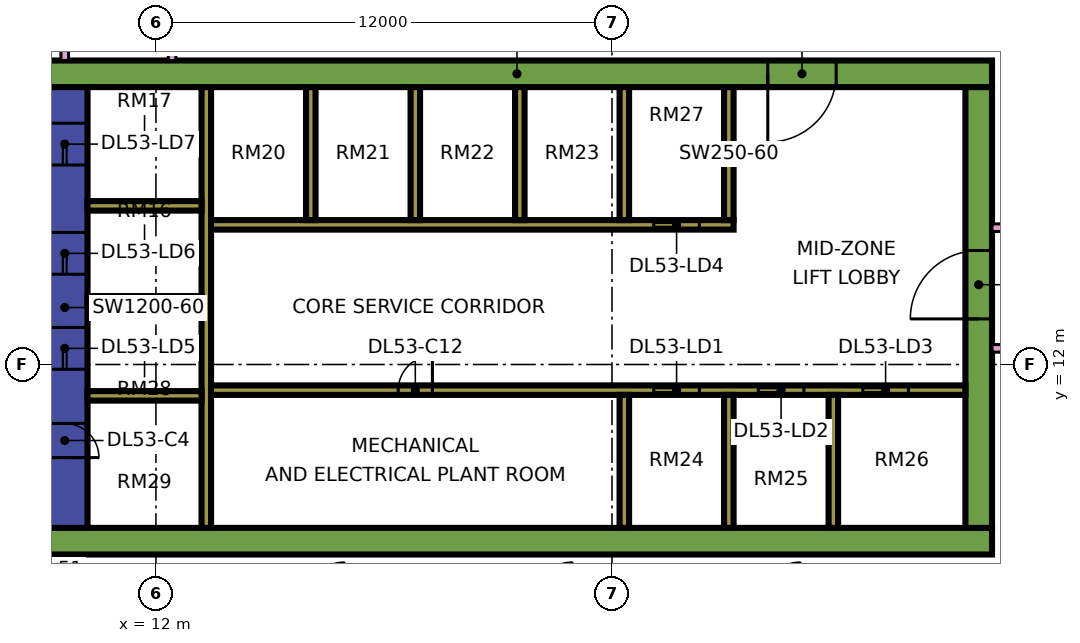
"""IFC4 building model, lengths in metres.
Left out: names, types, materials, properties, quantities, classifications, styles, units other than length and angle.
Written with IfcOpenShell. Run it as: python <this file> out.ifc"""

import sys

from ifc_helpers import new_model, si_unit, direction, frame, frame_2d, origin, place, context, subcontext, project, spatial, rectangle, extrude, element, fill, save


model = new_model("IFC4")
c1 = context("Model", 3, precision=1e-05, world=origin(), true_north=direction((0.0, 1.0)))
c2 = subcontext(c1, "Body", "Model", "MODEL_VIEW")
j1 = project(units=[si_unit("LENGTHUNIT", "METRE"), si_unit("PLANEANGLEUNIT", "RADIAN")], contexts=[c1])
p1 = place(None, origin())
s1 = spatial("IfcSite", under=j1, at=p1, CompositionType="ELEMENT")
p2 = place(p1, origin())
s2 = spatial("IfcBuilding", under=s1, at=p2, CompositionType="ELEMENT")
p3 = place(p2, frame((0.0, 0.0, 226.65)))
s3 = spatial("IfcBuildingStorey", under=s2, at=p3, CompositionType="ELEMENT", Elevation=226.65)
p4 = place(p3, frame((9.0, 7.35, 0.0), z_axis=(0.0, 0.0, 1.0), x_axis=(1.0, 0.0, 0.0)))
e1 = element("IfcWall", 1, at=p4, inside=s3, PredefinedType="SHEAR", context=c2, shape_type="SweptSolid", body=[
    extrude(rectangle(XDim=25.0, YDim=0.7, at=frame_2d((12.5, 0.0))), origin(), (0.0, 0.0, 1.0), 3.75),
])
p5 = place(p3, frame((9.0, 19.65, 0.0), z_axis=(0.0, 0.0, 1.0), x_axis=(1.0, 0.0, 0.0)))
e2 = element("IfcWall", 2, at=p5, inside=s3, PredefinedType="SHEAR", context=c2, shape_type="SweptSolid", body=[
    extrude(rectangle(XDim=25.0, YDim=0.7, at=frame_2d((12.5, 0.0))), origin(), (0.0, 0.0, 1.0), 3.75),
])
p6 = place(p5, frame((19.1, 0.0, 0.0)))
e3 = element("IfcOpeningElement", 3, at=p6, cuts=e2, PredefinedType="OPENING", context=c2, shape_type="SweptSolid", body=[
    extrude(rectangle(XDim=1.8, YDim=2.4, at=frame_2d((0.9, 1.2))), frame((0.0, 0.36, 0.0), z_axis=(0.0, -1.0, 0.0), x_axis=(1.0, 0.0, 0.0)), (0.0, 0.0, 1.0), 0.72),
])
p7 = place(p3, frame((9.6, 7.7, 0.0), z_axis=(0.0, 0.0, 1.0), x_axis=(0.0, 1.0, 0.0)))
e4 = element("IfcWall", 4, at=p7, inside=s3, PredefinedType="SHEAR", context=c2, shape_type="SweptSolid", body=[
    extrude(rectangle(XDim=11.6, YDim=1.2, at=frame_2d((5.8, 0.0))), origin(), (0.0, 0.0, 1.0), 3.75),
])
p8 = place(p7, frame((4.175, 0.0, 0.0)))
e5 = element("IfcOpeningElement", 5, at=p8, cuts=e4, PredefinedType="OPENING", context=c2, shape_type="SweptSolid", body=[
    extrude(rectangle(XDim=1.1, YDim=2.2, at=frame_2d((0.55, 1.1))), frame((0.0, 0.61, 0.0), z_axis=(0.0, -1.0, 0.0), x_axis=(1.0, 0.0, 0.0)), (0.0, 0.0, 1.0), 1.22),
])
p9 = place(p7, frame((6.675, 0.0, 0.0)))
e6 = element("IfcOpeningElement", 6, at=p9, cuts=e4, PredefinedType="OPENING", context=c2, shape_type="SweptSolid", body=[
    extrude(rectangle(XDim=1.1, YDim=2.2, at=frame_2d((0.55, 1.1))), frame((0.0, 0.61, 0.0), z_axis=(0.0, -1.0, 0.0), x_axis=(1.0, 0.0, 0.0)), (0.0, 0.0, 1.0), 1.22),
])
p10 = place(p7, frame((9.55, 0.0, 0.0)))
e7 = element("IfcOpeningElement", 7, at=p10, cuts=e4, PredefinedType="OPENING", context=c2, shape_type="SweptSolid", body=[
    extrude(rectangle(XDim=1.1, YDim=2.2, at=frame_2d((0.55, 1.1))), frame((0.0, 0.61, 0.0), z_axis=(0.0, -1.0, 0.0), x_axis=(1.0, 0.0, 0.0)), (0.0, 0.0, 1.0), 1.22),
])
p11 = place(p7, frame((1.85, 0.0, 0.0)))
e8 = element("IfcOpeningElement", 8, at=p11, cuts=e4, PredefinedType="OPENING", context=c2, shape_type="SweptSolid", body=[
    extrude(rectangle(XDim=0.9, YDim=2.1, at=frame_2d((0.45, 1.05))), frame((0.0, 0.61, 0.0), z_axis=(0.0, -1.0, 0.0), x_axis=(1.0, 0.0, 0.0)), (0.0, 0.0, 1.0), 1.22),
])
p12 = place(p3, frame((33.65, 7.7, 0.0), z_axis=(0.0, 0.0, 1.0), x_axis=(0.0, 1.0, 0.0)))
e9 = element("IfcWall", 9, at=p12, inside=s3, PredefinedType="SHEAR", context=c2, shape_type="SweptSolid", body=[
    extrude(rectangle(XDim=11.6, YDim=0.7, at=frame_2d((5.8, 0.0))), origin(), (0.0, 0.0, 1.0), 3.75),
])
p13 = place(p12, frame((5.5, 0.0, 0.0)))
e10 = element("IfcOpeningElement", 10, at=p13, cuts=e9, PredefinedType="OPENING", context=c2, shape_type="SweptSolid", body=[
    extrude(rectangle(XDim=1.8, YDim=2.4, at=frame_2d((0.9, 1.2))), frame((0.0, 0.36, 0.0), z_axis=(0.0, -1.0, 0.0), x_axis=(1.0, 0.0, 0.0)), (0.0, 0.0, 1.0), 0.72),
])
p14 = place(p3, frame((13.325, 7.7, 0.0), z_axis=(0.0, 0.0, 1.0), x_axis=(0.0, 1.0, 0.0)))
e11 = element("IfcWall", 11, at=p14, inside=s3, PredefinedType="SHEAR", context=c2, shape_type="SweptSolid", body=[
    extrude(rectangle(XDim=11.6, YDim=0.25, at=frame_2d((5.8, 0.0))), origin(), (0.0, 0.0, 1.0), 3.75),
])
p15 = place(p3, frame((13.45, 11.325, 0.0), z_axis=(0.0, 0.0, 1.0), x_axis=(1.0, 0.0, 0.0)))
e12 = element("IfcWall", 12, at=p15, inside=s3, PredefinedType="SHEAR", context=c2, shape_type="SweptSolid", body=[
    extrude(rectangle(XDim=19.85, YDim=0.25, at=frame_2d((9.925, 0.0))), origin(), (0.0, 0.0, 1.0), 3.75),
])
p16 = place(p15, frame((11.65, 0.0, 0.0)))
e13 = element("IfcOpeningElement", 13, at=p16, cuts=e12, PredefinedType="OPENING", context=c2, shape_type="SweptSolid", body=[
    extrude(rectangle(XDim=1.2, YDim=2.2, at=frame_2d((0.6, 1.1))), frame((0.0, 0.135, 0.0), z_axis=(0.0, -1.0, 0.0), x_axis=(1.0, 0.0, 0.0)), (0.0, 0.0, 1.0), 0.27),
])
p17 = place(p15, frame((14.4, 0.0, 0.0)))
e14 = element("IfcOpeningElement", 14, at=p17, cuts=e12, PredefinedType="OPENING", context=c2, shape_type="SweptSolid", body=[
    extrude(rectangle(XDim=1.2, YDim=2.2, at=frame_2d((0.6, 1.1))), frame((0.0, 0.135, 0.0), z_axis=(0.0, -1.0, 0.0), x_axis=(1.0, 0.0, 0.0)), (0.0, 0.0, 1.0), 0.27),
])
p18 = place(p15, frame((17.15, 0.0, 0.0)))
e15 = element("IfcOpeningElement", 15, at=p18, cuts=e12, PredefinedType="OPENING", context=c2, shape_type="SweptSolid", body=[
    extrude(rectangle(XDim=1.2, YDim=2.2, at=frame_2d((0.6, 1.1))), frame((0.0, 0.135, 0.0), z_axis=(0.0, -1.0, 0.0), x_axis=(1.0, 0.0, 0.0)), (0.0, 0.0, 1.0), 0.27),
])
p19 = place(p15, frame((4.925, 0.0, 0.0)))
e16 = element("IfcOpeningElement", 16, at=p19, cuts=e12, PredefinedType="OPENING", context=c2, shape_type="SweptSolid", body=[
    extrude(rectangle(XDim=0.9, YDim=2.1, at=frame_2d((0.45, 1.05))), frame((0.0, 0.135, 0.0), z_axis=(0.0, -1.0, 0.0), x_axis=(1.0, 0.0, 0.0)), (0.0, 0.0, 1.0), 0.27),
])
p20 = place(p3, frame((13.45, 15.675, 0.0), z_axis=(0.0, 0.0, 1.0), x_axis=(1.0, 0.0, 0.0)))
e17 = element("IfcWall", 17, at=p20, inside=s3, PredefinedType="SHEAR", context=c2, shape_type="SweptSolid", body=[
    extrude(rectangle(XDim=13.75, YDim=0.25, at=frame_2d((6.875, 0.0))), origin(), (0.0, 0.0, 1.0), 3.75),
])
p21 = place(p20, frame((11.65, 0.0, 0.0)))
e18 = element("IfcOpeningElement", 18, at=p21, cuts=e17, PredefinedType="OPENING", context=c2, shape_type="SweptSolid", body=[
    extrude(rectangle(XDim=1.2, YDim=2.2, at=frame_2d((0.6, 1.1))), frame((0.0, 0.135, 0.0), z_axis=(0.0, -1.0, 0.0), x_axis=(1.0, 0.0, 0.0)), (0.0, 0.0, 1.0), 0.27),
])
for number, where, z_axis, x_axis in (
    (19, (10.2, 11.175, 0.0), (0.0, 0.0, 1.0), (1.0, 0.0, 0.0)),
    (20, (10.2, 13.675, 0.0), (0.0, 0.0, 1.0), (1.0, 0.0, 0.0)),
    (21, (10.2, 16.175, 0.0), (0.0, 0.0, 1.0), (1.0, 0.0, 0.0)),
):
    element("IfcWall", number, at=place(p3, frame(where, z_axis=z_axis, x_axis=x_axis)), inside=s3, PredefinedType="SHEAR", context=c2, shape_type="SweptSolid", body=[
        extrude(rectangle(XDim=3.0, YDim=0.25, at=frame_2d((1.5, 0.0))), origin(), (0.0, 0.0, 1.0), 3.75),
    ])
for number, where, z_axis, x_axis in (
    (22, (24.325, 7.7, 0.0), (0.0, 0.0, 1.0), (0.0, 1.0, 0.0)),
    (23, (27.075, 7.7, 0.0), (0.0, 0.0, 1.0), (0.0, 1.0, 0.0)),
    (24, (29.825, 7.7, 0.0), (0.0, 0.0, 1.0), (0.0, 1.0, 0.0)),
    (25, (16.075, 15.8, 0.0), (0.0, 0.0, 1.0), (0.0, 1.0, 0.0)),
    (26, (18.825, 15.8, 0.0), (0.0, 0.0, 1.0), (0.0, 1.0, 0.0)),
    (27, (21.575, 15.8, 0.0), (0.0, 0.0, 1.0), (0.0, 1.0, 0.0)),
    (28, (24.325, 15.8, 0.0), (0.0, 0.0, 1.0), (0.0, 1.0, 0.0)),
    (29, (27.075, 15.8, 0.0), (0.0, 0.0, 1.0), (0.0, 1.0, 0.0)),
):
    element("IfcWall", number, at=place(p3, frame(where, z_axis=z_axis, x_axis=x_axis)), inside=s3, PredefinedType="SHEAR", context=c2, shape_type="SweptSolid", body=[
        extrude(rectangle(XDim=3.5, YDim=0.25, at=frame_2d((1.75, 0.0))), origin(), (0.0, 0.0, 1.0), 3.75),
    ])
p22 = place(p3, frame((-1.447, 12.553, 0.0), z_axis=(0.0, 0.0, 1.0), x_axis=(0.707106781187, -0.707106781187, 0.0)))
e30 = element("IfcWall", 30, at=p22, inside=s3, PredefinedType="SOLIDWALL", context=c2, shape_type="SweptSolid", body=[
    extrude(rectangle(XDim=19.799, YDim=0.15, at=frame_2d((9.899, 0.0))), origin(), (0.0, 0.0, 1.0), 3.35),
])
p23 = place(p22, frame((2.212, 0.0, 0.45)))
e31 = element("IfcOpeningElement", 31, at=p23, cuts=e30, PredefinedType="OPENING", context=c2, shape_type="SweptSolid", body=[
    extrude(rectangle(XDim=3.0, YDim=2.4, at=frame_2d((1.5, 1.2))), frame((0.0, 0.085, 0.0), z_axis=(0.0, -1.0, 0.0), x_axis=(1.0, 0.0, 0.0)), (0.0, 0.0, 1.0), 0.17),
])
p24 = place(p22, frame((10.216, 0.0, 0.45)))
e32 = element("IfcOpeningElement", 32, at=p24, cuts=e30, PredefinedType="OPENING", context=c2, shape_type="SweptSolid", body=[
    extrude(rectangle(XDim=3.0, YDim=2.4, at=frame_2d((1.5, 1.2))), frame((0.0, 0.085, 0.0), z_axis=(0.0, -1.0, 0.0), x_axis=(1.0, 0.0, 0.0)), (0.0, 0.0, 1.0), 0.17),
])
p25 = place(p3, frame((9.6, 20.0, 0.0), z_axis=(0.0, 0.0, 1.0), x_axis=(0.0, 1.0, 0.0)))
e33 = element("IfcWall", 33, at=p25, inside=s3, PredefinedType="PARTITIONING", context=c2, shape_type="SweptSolid", body=[
    extrude(rectangle(XDim=44.35, YDim=0.2, at=frame_2d((22.175, 0.0))), origin(), (0.0, 0.0, 1.0), 3.35),
])
p26 = place(p25, frame((17.1, 0.0, 0.0)))
e34 = element("IfcOpeningElement", 34, at=p26, cuts=e33, PredefinedType="OPENING", context=c2, shape_type="SweptSolid", body=[
    extrude(rectangle(XDim=1.0, YDim=2.1, at=frame_2d((0.5, 1.05))), frame((0.0, 0.11, 0.0), z_axis=(0.0, -1.0, 0.0), x_axis=(1.0, 0.0, 0.0)), (0.0, 0.0, 1.0), 0.22),
])
p27 = place(p25, frame((0.6, 0.0, 0.0)))
e35 = element("IfcOpeningElement", 35, at=p27, cuts=e33, PredefinedType="OPENING", context=c2, shape_type="SweptSolid", body=[
    extrude(rectangle(XDim=1.2, YDim=2.1, at=frame_2d((0.6, 1.05))), frame((0.0, 0.11, 0.0), z_axis=(0.0, -1.0, 0.0), x_axis=(1.0, 0.0, 0.0)), (0.0, 0.0, 1.0), 0.22),
])
p28 = place(p25, frame((3.9, 0.0, 0.0)))
e36 = element("IfcOpeningElement", 36, at=p28, cuts=e33, PredefinedType="OPENING", context=c2, shape_type="SweptSolid", body=[
    extrude(rectangle(XDim=1.0, YDim=2.1, at=frame_2d((0.5, 1.05))), frame((0.0, 0.11, 0.0), z_axis=(0.0, -1.0, 0.0), x_axis=(1.0, 0.0, 0.0)), (0.0, 0.0, 1.0), 0.22),
])
p29 = place(p3, frame((12.425, 20.0, 0.0), z_axis=(0.0, 0.0, 1.0), x_axis=(0.0, 1.0, 0.0)))
e37 = element("IfcWall", 37, at=p29, inside=s3, PredefinedType="PARTITIONING", context=c2, shape_type="SweptSolid", body=[
    extrude(rectangle(XDim=42.926, YDim=0.2, at=frame_2d((21.463, 0.0))), origin(), (0.0, 0.0, 1.0), 3.35),
])
p30 = place(p29, frame((6.7, 0.0, 0.0)))
e38 = element("IfcOpeningElement", 38, at=p30, cuts=e37, PredefinedType="OPENING", context=c2, shape_type="SweptSolid", body=[
    extrude(rectangle(XDim=1.6, YDim=2.1, at=frame_2d((0.8, 1.05))), frame((0.0, 0.11, 0.0), z_axis=(0.0, -1.0, 0.0), x_axis=(1.0, 0.0, 0.0)), (0.0, 0.0, 1.0), 0.22),
])
p31 = place(p29, frame((12.95, 0.0, 0.0)))
e39 = element("IfcOpeningElement", 39, at=p31, cuts=e37, PredefinedType="OPENING", context=c2, shape_type="SweptSolid", body=[
    extrude(rectangle(XDim=1.0, YDim=2.1, at=frame_2d((0.5, 1.05))), frame((0.0, 0.11, 0.0), z_axis=(0.0, -1.0, 0.0), x_axis=(1.0, 0.0, 0.0)), (0.0, 0.0, 1.0), 0.22),
])
p32 = place(p29, frame((23.2, 0.0, 0.0)))
e40 = element("IfcOpeningElement", 40, at=p32, cuts=e37, PredefinedType="OPENING", context=c2, shape_type="SweptSolid", body=[
    extrude(rectangle(XDim=1.0, YDim=2.1, at=frame_2d((0.5, 1.05))), frame((0.0, 0.11, 0.0), z_axis=(0.0, -1.0, 0.0), x_axis=(1.0, 0.0, 0.0)), (0.0, 0.0, 1.0), 0.22),
])
p33 = place(p29, frame((35.35, 0.0, 0.0)))
e41 = element("IfcOpeningElement", 41, at=p33, cuts=e37, PredefinedType="OPENING", context=c2, shape_type="SweptSolid", body=[
    extrude(rectangle(XDim=1.0, YDim=2.1, at=frame_2d((0.5, 1.05))), frame((0.0, 0.11, 0.0), z_axis=(0.0, -1.0, 0.0), x_axis=(1.0, 0.0, 0.0)), (0.0, 0.0, 1.0), 0.22),
])
p34 = place(p29, frame((1.15, 0.0, 0.0)))
e42 = element("IfcOpeningElement", 42, at=p34, cuts=e37, PredefinedType="OPENING", context=c2, shape_type="SweptSolid", body=[
    extrude(rectangle(XDim=1.8, YDim=2.1, at=frame_2d((0.9, 1.05))), frame((0.0, 0.11, 0.0), z_axis=(0.0, -1.0, 0.0), x_axis=(1.0, 0.0, 0.0)), (0.0, 0.0, 1.0), 0.22),
])
p35 = place(p29, frame((28.6, 0.0, 0.0)))
e43 = element("IfcOpeningElement", 43, at=p35, cuts=e37, PredefinedType="OPENING", context=c2, shape_type="SweptSolid", body=[
    extrude(rectangle(XDim=1.8, YDim=2.1, at=frame_2d((0.9, 1.05))), frame((0.0, 0.11, 0.0), z_axis=(0.0, -1.0, 0.0), x_axis=(1.0, 0.0, 0.0)), (0.0, 0.0, 1.0), 0.22),
])
p36 = place(p3, frame((34.0, 12.425, 0.0), z_axis=(0.0, 0.0, 1.0), x_axis=(1.0, 0.0, 0.0)))
e44 = element("IfcWall", 44, at=p36, inside=s3, PredefinedType="PARTITIONING", context=c2, shape_type="SweptSolid", body=[
    extrude(rectangle(XDim=2.426, YDim=0.2, at=frame_2d((1.213, 0.0))), origin(), (0.0, 0.0, 1.0), 3.35),
])
p37 = place(p3, frame((34.0, 15.6, 0.0), z_axis=(0.0, 0.0, 1.0), x_axis=(1.0, 0.0, 0.0)))
e45 = element("IfcWall", 45, at=p37, inside=s3, PredefinedType="PARTITIONING", context=c2, shape_type="SweptSolid", body=[
    extrude(rectangle(XDim=10.35, YDim=0.2, at=frame_2d((5.175, 0.0))), origin(), (0.0, 0.0, 1.0), 3.35),
])
p38 = place(p37, frame((5.6, 0.0, 0.0)))
e46 = element("IfcOpeningElement", 46, at=p38, cuts=e45, PredefinedType="OPENING", context=c2, shape_type="SweptSolid", body=[
    extrude(rectangle(XDim=1.0, YDim=2.1, at=frame_2d((0.5, 1.05))), frame((0.0, 0.11, 0.0), z_axis=(0.0, -1.0, 0.0), x_axis=(1.0, 0.0, 0.0)), (0.0, 0.0, 1.0), 0.22),
])
p39 = place(p37, frame((0.45, 0.0, 0.0)))
e47 = element("IfcOpeningElement", 47, at=p39, cuts=e45, PredefinedType="OPENING", context=c2, shape_type="SweptSolid", body=[
    extrude(rectangle(XDim=1.2, YDim=2.1, at=frame_2d((0.6, 1.05))), frame((0.0, 0.11, 0.0), z_axis=(0.0, -1.0, 0.0), x_axis=(1.0, 0.0, 0.0)), (0.0, 0.0, 1.0), 0.22),
])
p40 = place(p16, origin())
e48 = element("IfcDoor", 48, at=p40, inside=s3, OperationType="DOUBLE_DOOR_SLIDING", PredefinedType="DOOR", context=c2, shape_type="SweptSolid", body=[
    extrude(rectangle(XDim=1.2, YDim=2.2, at=frame_2d((0.6, 1.1))), frame((0.0, 0.025, 0.0), z_axis=(0.0, -1.0, 0.0), x_axis=(1.0, 0.0, 0.0)), (0.0, 0.0, 1.0), 0.05),
])
fill(e13, e48)
p41 = place(p17, origin())
e49 = element("IfcDoor", 49, at=p41, inside=s3, OperationType="DOUBLE_DOOR_SLIDING", PredefinedType="DOOR", context=c2, shape_type="SweptSolid", body=[
    extrude(rectangle(XDim=1.2, YDim=2.2, at=frame_2d((0.6, 1.1))), frame((0.0, 0.025, 0.0), z_axis=(0.0, -1.0, 0.0), x_axis=(1.0, 0.0, 0.0)), (0.0, 0.0, 1.0), 0.05),
])
fill(e14, e49)
p42 = place(p18, origin())
e50 = element("IfcDoor", 50, at=p42, inside=s3, OperationType="DOUBLE_DOOR_SLIDING", PredefinedType="DOOR", context=c2, shape_type="SweptSolid", body=[
    extrude(rectangle(XDim=1.2, YDim=2.2, at=frame_2d((0.6, 1.1))), frame((0.0, 0.025, 0.0), z_axis=(0.0, -1.0, 0.0), x_axis=(1.0, 0.0, 0.0)), (0.0, 0.0, 1.0), 0.05),
])
fill(e15, e50)
p43 = place(p21, origin())
e51 = element("IfcDoor", 51, at=p43, inside=s3, OperationType="DOUBLE_DOOR_SLIDING", PredefinedType="DOOR", context=c2, shape_type="SweptSolid", body=[
    extrude(rectangle(XDim=1.2, YDim=2.2, at=frame_2d((0.6, 1.1))), frame((0.0, 0.025, 0.0), z_axis=(0.0, -1.0, 0.0), x_axis=(1.0, 0.0, 0.0)), (0.0, 0.0, 1.0), 0.05),
])
fill(e18, e51)
p44 = place(p8, origin())
e52 = element("IfcDoor", 52, at=p44, inside=s3, OperationType="DOUBLE_DOOR_SLIDING", PredefinedType="DOOR", context=c2, shape_type="SweptSolid", body=[
    extrude(rectangle(XDim=1.1, YDim=2.2, at=frame_2d((0.55, 1.1))), frame((0.0, 0.025, 0.0), z_axis=(0.0, -1.0, 0.0), x_axis=(1.0, 0.0, 0.0)), (0.0, 0.0, 1.0), 0.05),
])
fill(e5, e52)
p45 = place(p9, origin())
e53 = element("IfcDoor", 53, at=p45, inside=s3, OperationType="DOUBLE_DOOR_SLIDING", PredefinedType="DOOR", context=c2, shape_type="SweptSolid", body=[
    extrude(rectangle(XDim=1.1, YDim=2.2, at=frame_2d((0.55, 1.1))), frame((0.0, 0.025, 0.0), z_axis=(0.0, -1.0, 0.0), x_axis=(1.0, 0.0, 0.0)), (0.0, 0.0, 1.0), 0.05),
])
fill(e6, e53)
p46 = place(p10, origin())
e54 = element("IfcDoor", 54, at=p46, inside=s3, OperationType="DOUBLE_DOOR_SLIDING", PredefinedType="DOOR", context=c2, shape_type="SweptSolid", body=[
    extrude(rectangle(XDim=1.1, YDim=2.2, at=frame_2d((0.55, 1.1))), frame((0.0, 0.025, 0.0), z_axis=(0.0, -1.0, 0.0), x_axis=(1.0, 0.0, 0.0)), (0.0, 0.0, 1.0), 0.05),
])
fill(e7, e54)
p47 = place(p13, origin())
e55 = element("IfcDoor", 55, at=p47, inside=s3, OperationType="DOUBLE_DOOR_SINGLE_SWING", PredefinedType="DOOR", context=c2, shape_type="SweptSolid", body=[
    extrude(rectangle(XDim=1.8, YDim=2.4, at=frame_2d((0.9, 1.2))), frame((0.0, 0.025, 0.0), z_axis=(0.0, -1.0, 0.0), x_axis=(1.0, 0.0, 0.0)), (0.0, 0.0, 1.0), 0.05),
])
fill(e10, e55)
p48 = place(p6, frame((1.8, 0.0, 0.0), z_axis=(0.0, 0.0, 1.0), x_axis=(-1.0, 0.0, 0.0)))
e56 = element("IfcDoor", 56, at=p48, inside=s3, OperationType="DOUBLE_DOOR_SINGLE_SWING", PredefinedType="DOOR", context=c2, shape_type="SweptSolid", body=[
    extrude(rectangle(XDim=1.8, YDim=2.4, at=frame_2d((0.9, 1.2))), frame((0.0, 0.025, 0.0), z_axis=(0.0, -1.0, 0.0), x_axis=(1.0, 0.0, 0.0)), (0.0, 0.0, 1.0), 0.05),
])
fill(e3, e56)
p49 = place(p11, frame((0.9, 0.0, 0.0), z_axis=(0.0, 0.0, 1.0), x_axis=(-1.0, 0.0, 0.0)))
e57 = element("IfcDoor", 57, at=p49, inside=s3, OperationType="SINGLE_SWING_LEFT", PredefinedType="DOOR", context=c2, shape_type="SweptSolid", body=[
    extrude(rectangle(XDim=0.9, YDim=2.1, at=frame_2d((0.45, 1.05))), frame((0.0, 0.025, 0.0), z_axis=(0.0, -1.0, 0.0), x_axis=(1.0, 0.0, 0.0)), (0.0, 0.0, 1.0), 0.05),
])
fill(e8, e57)
p50 = place(p19, frame((0.9, 0.0, 0.0), z_axis=(0.0, 0.0, 1.0), x_axis=(-1.0, 0.0, 0.0)))
e58 = element("IfcDoor", 58, at=p50, inside=s3, OperationType="SINGLE_SWING_RIGHT", PredefinedType="DOOR", context=c2, shape_type="SweptSolid", body=[
    extrude(rectangle(XDim=0.9, YDim=2.1, at=frame_2d((0.45, 1.05))), frame((0.0, 0.025, 0.0), z_axis=(0.0, -1.0, 0.0), x_axis=(1.0, 0.0, 0.0)), (0.0, 0.0, 1.0), 0.05),
])
fill(e16, e58)
save(model, sys.argv[1])
